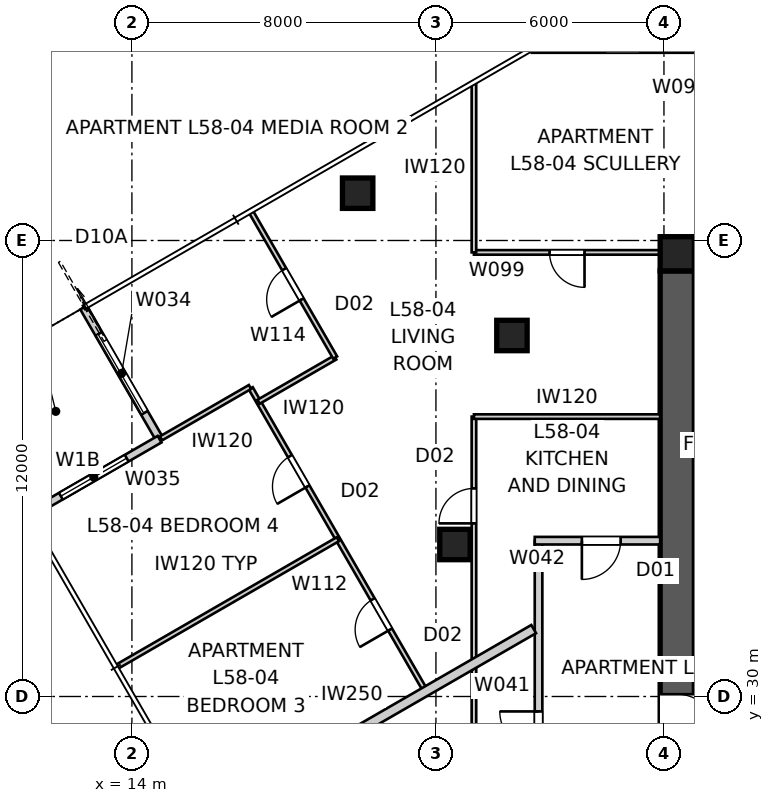
"""IFC4 building model, lengths in metres.
Left out: names, types, materials, properties, quantities, classifications, styles, units other than length and angle.
Written with IfcOpenShell. Run it as: python <this file> out.ifc"""

import sys

from ifc_helpers import new_model, si_unit, direction, frame, frame_2d, origin, origin_2d, place, context, subcontext, project, spatial, polyline, rectangle, outline, extrude, element, fill, save


model = new_model("IFC4")
c1 = context("Model", 3, precision=1e-05, world=origin(), true_north=direction((0.0, 1.0)))
c2 = subcontext(c1, "Body", "Model", "MODEL_VIEW")
j1 = project(units=[si_unit("LENGTHUNIT", "METRE"), si_unit("PLANEANGLEUNIT", "RADIAN")], contexts=[c1])
p1 = place(None, origin())
s1 = spatial("IfcSite", under=j1, at=p1, CompositionType="ELEMENT")
p2 = place(p1, origin())
s2 = spatial("IfcBuilding", under=s1, at=p2, CompositionType="ELEMENT")
p3 = place(p2, frame((0.0, 0.0, 211.6)))
s3 = spatial("IfcBuildingStorey", under=s2, at=p3, CompositionType="ELEMENT", Elevation=211.6)
p4 = place(p3, frame((28.8, 41.65, 0.0), z_axis=(0.0, 0.0, 1.0), x_axis=(1.0, 0.0, 0.0)))
e1 = element("IfcWall", 1, at=p4, inside=s3, PredefinedType="SHEAR", context=c2, shape_type="SweptSolid", body=[
    extrude(outline(polyline([(0.0, -0.45), (22.4, -0.45), (22.4, -0.025), (22.85, -0.025), (22.85, 0.025), (22.4, 0.025), (22.4, 0.45), (0.0, 0.45), (0.0, 0.025), (-0.45, 0.025), (-0.45, -0.025), (0.0, -0.025), (0.0, -0.45)])), origin(), (0.0, 0.0, 1.0), 3.4),
])
p5 = place(p3, frame((28.35, 41.2, 0.0), z_axis=(0.0, 0.0, 1.0), x_axis=(0.0, -1.0, 0.0)))
e2 = element("IfcWall", 2, at=p5, inside=s3, PredefinedType="SHEAR", context=c2, shape_type="SweptSolid", body=[
    extrude(outline(polyline([(0.0, -0.45), (22.4, -0.45), (22.4, -0.025), (22.85, -0.025), (22.85, 0.025), (22.4, 0.025), (22.4, 0.45), (0.0, 0.45), (0.0, 0.025), (-0.45, 0.025), (-0.45, -0.025), (0.0, -0.025), (0.0, -0.45)])), origin(), (0.0, 0.0, 1.0), 3.4),
])
p6 = place(p5, frame((11.14, 0.0, 0.0)))
e3 = element("IfcOpeningElement", 3, at=p6, cuts=e2, PredefinedType="OPENING", context=c2, shape_type="SweptSolid", body=[
    extrude(rectangle(XDim=1.02, YDim=2.4, at=frame_2d((0.51, 1.2))), frame((0.0, 0.46, 0.0), z_axis=(0.0, -1.0, 0.0), x_axis=(1.0, 0.0, 0.0)), (0.0, 0.0, 1.0), 0.92),
])
p7 = place(p3, frame((28.35, 41.65, 0.0), z_axis=(0.0, 0.0, 1.0), x_axis=(1.0, 0.0, 0.0)))
e4 = element("IfcColumn", 4, at=p7, inside=s3, PredefinedType="COLUMN", context=c2, shape_type="SweptSolid", body=[
    extrude(rectangle(XDim=0.9, YDim=0.9, at=origin_2d()), origin(), (0.0, 0.0, 1.0), 3.4),
])
for number, where, z_axis, x_axis in (
    (5, (19.94, 43.245, 0.0), (0.0, 0.0, 1.0), (1.0, 0.0, 0.0)),
    (6, (24.0, 39.5, 0.0), (0.0, 0.0, 1.0), (1.0, 0.0, 0.0)),
    (7, (22.5, 34.0, 0.0), (0.0, 0.0, 1.0), (1.0, 0.0, 0.0)),
):
    element("IfcColumn", number, at=place(p3, frame(where, z_axis=z_axis, x_axis=x_axis)), inside=s3, PredefinedType="COLUMN", context=c2, shape_type="SweptSolid", body=[
        extrude(rectangle(XDim=0.8, YDim=0.8, at=origin_2d()), origin(), (0.0, 0.0, 1.0), 3.4),
    ])
p8 = place(p3, frame((12.729, 40.236, 0.0), z_axis=(0.0, 0.0, 1.0), x_axis=(0.49999894854, -0.866026010844, 0.0)))
e8 = element("IfcWall", 8, at=p8, inside=s3, PredefinedType="SOLIDWALL", context=c2, shape_type="SweptSolid", body=[
    extrude(rectangle(XDim=4.0, YDim=0.2, at=frame_2d((2.0, 0.0))), origin(), (0.0, 0.0, 1.0), 3.25),
])
p9 = place(p8, frame((0.8, 0.0, 0.0)))
e9 = element("IfcOpeningElement", 9, at=p9, cuts=e8, PredefinedType="OPENING", context=c2, shape_type="SweptSolid", body=[
    extrude(rectangle(XDim=2.4, YDim=2.1, at=frame_2d((1.2, 1.05))), frame((0.0, 0.11, 0.0), z_axis=(0.0, -1.0, 0.0), x_axis=(1.0, 0.0, 0.0)), (0.0, 0.0, 1.0), 0.22),
])
p10 = place(p3, frame((14.729, 36.771, 0.0), z_axis=(0.0, 0.0, 1.0), x_axis=(-0.866026010844, -0.49999894854, 0.0)))
e10 = element("IfcWall", 10, at=p10, inside=s3, PredefinedType="SOLIDWALL", context=c2, shape_type="SweptSolid", body=[
    extrude(rectangle(XDim=4.0, YDim=0.2, at=frame_2d((2.0, 0.0))), origin(), (0.0, 0.0, 1.0), 3.25),
])
p11 = place(p10, frame((1.0, 0.0, 0.45)))
e11 = element("IfcOpeningElement", 11, at=p11, cuts=e10, PredefinedType="OPENING", context=c2, shape_type="SweptSolid", body=[
    extrude(rectangle(XDim=2.0, YDim=1.8, at=frame_2d((1.0, 0.9))), frame((0.0, 0.11, 0.0), z_axis=(0.0, -1.0, 0.0), x_axis=(1.0, 0.0, 0.0)), (0.0, 0.0, 1.0), 0.22),
])
p12 = place(p3, frame((24.7, 25.9, 0.0), z_axis=(0.0, 0.0, 1.0), x_axis=(0.0, 1.0, 0.0)))
e12 = element("IfcWall", 12, at=p12, inside=s3, PredefinedType="PARTITIONING", context=c2, shape_type="SweptSolid", body=[
    extrude(rectangle(XDim=8.2, YDim=0.2, at=frame_2d((4.1, 0.0))), origin(), (0.0, 0.0, 1.0), 3.25),
])
p13 = place(p12, frame((2.687, 0.0, 0.0)))
e13 = element("IfcOpeningElement", 13, at=p13, cuts=e12, PredefinedType="OPENING", context=c2, shape_type="SweptSolid", body=[
    extrude(rectangle(XDim=1.02, YDim=2.34, at=frame_2d((0.51, 1.17))), frame((0.0, 0.11, 0.0), z_axis=(0.0, -1.0, 0.0), x_axis=(1.0, 0.0, 0.0)), (0.0, 0.0, 1.0), 0.22),
])
p14 = place(p3, frame((27.9, 34.1, 0.0), z_axis=(0.0, 0.0, 1.0), x_axis=(-1.0, 0.0, 0.0)))
e14 = element("IfcWall", 14, at=p14, inside=s3, PredefinedType="PARTITIONING", context=c2, shape_type="SweptSolid", body=[
    extrude(rectangle(XDim=3.3, YDim=0.2, at=frame_2d((1.65, 0.0))), origin(), (0.0, 0.0, 1.0), 3.25),
])
p15 = place(p14, frame((1.04, 0.0, 0.0)))
e15 = element("IfcOpeningElement", 15, at=p15, cuts=e14, PredefinedType="OPENING", context=c2, shape_type="SweptSolid", body=[
    extrude(rectangle(XDim=1.02, YDim=2.34, at=frame_2d((0.51, 1.17))), frame((0.0, 0.11, 0.0), z_axis=(0.0, -1.0, 0.0), x_axis=(1.0, 0.0, 0.0)), (0.0, 0.0, 1.0), 0.22),
])
p16 = place(p3, frame((15.889, 26.761, 0.0), z_axis=(0.0, 0.0, 1.0), x_axis=(0.866024190901, 0.50000210077, 0.0)))
e16 = element("IfcWall", 16, at=p16, inside=s3, PredefinedType="PARTITIONING", context=c2, shape_type="SweptSolid", body=[
    extrude(rectangle(XDim=10.026, YDim=0.25, at=frame_2d((5.013, 0.0))), origin(), (0.0, 0.0, 1.0), 3.25),
])
p17 = place(p3, frame((23.0, 20.185, 0.0), z_axis=(0.0, 0.0, 1.0), x_axis=(0.0, 1.0, 0.0)))
e17 = element("IfcWall", 17, at=p17, inside=s3, PredefinedType="PARTITIONING", context=c2, shape_type="SweptSolid", body=[
    extrude(rectangle(XDim=17.18, YDim=0.12, at=frame_2d((8.59, 0.0))), origin(), (0.0, 0.0, 1.0), 2.55),
])
p18 = place(p17, frame((7.688, 0.0, 0.0)))
e18 = element("IfcOpeningElement", 18, at=p18, cuts=e17, PredefinedType="OPENING", context=c2, shape_type="SweptSolid", body=[
    extrude(rectangle(XDim=0.92, YDim=2.34, at=frame_2d((0.46, 1.17))), frame((0.0, 0.07, 0.0), z_axis=(0.0, -1.0, 0.0), x_axis=(1.0, 0.0, 0.0)), (0.0, 0.0, 1.0), 0.14),
])
p19 = place(p17, frame((14.371, 0.0, 0.0)))
e19 = element("IfcOpeningElement", 19, at=p19, cuts=e17, PredefinedType="OPENING", context=c2, shape_type="SweptSolid", body=[
    extrude(rectangle(XDim=0.92, YDim=2.34, at=frame_2d((0.46, 1.17))), frame((0.0, 0.07, 0.0), z_axis=(0.0, -1.0, 0.0), x_axis=(1.0, 0.0, 0.0)), (0.0, 0.0, 1.0), 0.14),
])
p20 = place(p3, frame((23.0, 37.365, 0.0), z_axis=(0.0, 0.0, 1.0), x_axis=(1.0, 0.0, 0.0)))
e20 = element("IfcWall", 20, at=p20, inside=s3, PredefinedType="PARTITIONING", context=c2, shape_type="SweptSolid", body=[
    extrude(rectangle(XDim=4.9, YDim=0.12, at=frame_2d((2.45, 0.0))), origin(), (0.0, 0.0, 1.0), 3.25),
])
p21 = place(p3, frame((27.9, 41.687, 0.0), z_axis=(0.0, 0.0, 1.0), x_axis=(-1.0, 0.0, 0.0)))
e21 = element("IfcWall", 21, at=p21, inside=s3, PredefinedType="PARTITIONING", context=c2, shape_type="SweptSolid", body=[
    extrude(rectangle(XDim=4.9, YDim=0.12, at=frame_2d((2.45, 0.0))), origin(), (0.0, 0.0, 1.0), 3.25),
])
p22 = place(p21, frame((1.99, 0.0, 0.0)))
e22 = element("IfcOpeningElement", 22, at=p22, cuts=e21, PredefinedType="OPENING", context=c2, shape_type="SweptSolid", body=[
    extrude(rectangle(XDim=0.92, YDim=2.1, at=frame_2d((0.46, 1.05))), frame((0.0, 0.07, 0.0), z_axis=(0.0, -1.0, 0.0), x_axis=(1.0, 0.0, 0.0)), (0.0, 0.0, 1.0), 0.14),
])
p23 = place(p3, frame((23.0, 41.687, 0.0), z_axis=(0.0, 0.0, 1.0), x_axis=(0.0, 1.0, 0.0)))
e23 = element("IfcWall", 23, at=p23, inside=s3, PredefinedType="PARTITIONING", context=c2, shape_type="SweptSolid", body=[
    extrude(rectangle(XDim=4.433, YDim=0.12, at=frame_2d((2.216, 0.0))), origin(), (0.0, 0.0, 1.0), 3.25),
])
p24 = place(p3, frame((24.525, 47.0, 0.0), z_axis=(0.0, 0.0, 1.0), x_axis=(1.0, 0.0, 0.0)))
e24 = element("IfcWall", 24, at=p24, inside=s3, PredefinedType="PARTITIONING", context=c2, shape_type="SweptSolid", body=[
    extrude(rectangle(XDim=22.087, YDim=0.12, at=frame_2d((11.044, 0.0))), origin(), (0.0, 0.0, 1.0), 2.55),
])
p25 = place(p24, frame((1.928, 0.0, 0.0)))
e25 = element("IfcOpeningElement", 25, at=p25, cuts=e24, PredefinedType="OPENING", context=c2, shape_type="SweptSolid", body=[
    extrude(rectangle(XDim=0.92, YDim=2.34, at=frame_2d((0.46, 1.17))), frame((0.0, 0.07, 0.0), z_axis=(0.0, -1.0, 0.0), x_axis=(1.0, 0.0, 0.0)), (0.0, 0.0, 1.0), 0.14),
])
p26 = place(p24, frame((17.73, 0.0, 0.0)))
e26 = element("IfcOpeningElement", 26, at=p26, cuts=e24, PredefinedType="OPENING", context=c2, shape_type="SweptSolid", body=[
    extrude(rectangle(XDim=0.96, YDim=2.1, at=frame_2d((0.48, 1.05))), frame((0.0, 0.07, 0.0), z_axis=(0.0, -1.0, 0.0), x_axis=(1.0, 0.0, 0.0)), (0.0, 0.0, 1.0), 0.14),
])
p27 = place(p3, frame((21.733, 30.134, 0.0), z_axis=(0.0, 0.0, 1.0), x_axis=(-0.500019218905, 0.86601430746, 0.0)))
e27 = element("IfcWall", 27, at=p27, inside=s3, PredefinedType="PARTITIONING", context=c2, shape_type="SweptSolid", body=[
    extrude(rectangle(XDim=9.21, YDim=0.12, at=frame_2d((4.605, 0.0))), origin(), (0.0, 0.0, 1.0), 3.25),
])
p28 = place(p27, frame((1.877, 0.0, 0.0)))
e28 = element("IfcOpeningElement", 28, at=p28, cuts=e27, PredefinedType="OPENING", context=c2, shape_type="SweptSolid", body=[
    extrude(rectangle(XDim=0.92, YDim=2.34, at=frame_2d((0.46, 1.17))), frame((0.0, 0.07, 0.0), z_axis=(0.0, -1.0, 0.0), x_axis=(1.0, 0.0, 0.0)), (0.0, 0.0, 1.0), 0.14),
])
p29 = place(p27, frame((6.228, 0.0, 0.0)))
e29 = element("IfcOpeningElement", 29, at=p29, cuts=e27, PredefinedType="OPENING", context=c2, shape_type="SweptSolid", body=[
    extrude(rectangle(XDim=0.92, YDim=2.34, at=frame_2d((0.46, 1.17))), frame((0.0, 0.07, 0.0), z_axis=(0.0, -1.0, 0.0), x_axis=(1.0, 0.0, 0.0)), (0.0, 0.0, 1.0), 0.14),
])
p30 = place(p3, frame((17.333, 37.755, 0.0), z_axis=(0.0, 0.0, 1.0), x_axis=(0.866059848015, 0.499940336097, 0.0)))
e30 = element("IfcWall", 30, at=p30, inside=s3, PredefinedType="PARTITIONING", context=c2, shape_type="SweptSolid", body=[
    extrude(rectangle(XDim=2.328, YDim=0.12, at=frame_2d((1.164, 0.0))), origin(), (0.0, 0.0, 1.0), 3.25),
])
p31 = place(p3, frame((19.349, 38.919, 0.0), z_axis=(0.0, 0.0, 1.0), x_axis=(-0.499997192861, 0.866027024481, 0.0)))
e31 = element("IfcWall", 31, at=p31, inside=s3, PredefinedType="PARTITIONING", context=c2, shape_type="SweptSolid", body=[
    extrude(rectangle(XDim=4.41, YDim=0.12, at=frame_2d((2.205, 0.0))), origin(), (0.0, 0.0, 1.0), 3.25),
])
p32 = place(p31, frame((1.765, 0.0, 0.0)))
e32 = element("IfcOpeningElement", 32, at=p32, cuts=e31, PredefinedType="OPENING", context=c2, shape_type="SweptSolid", body=[
    extrude(rectangle(XDim=0.92, YDim=2.34, at=frame_2d((0.46, 1.17))), frame((0.0, 0.07, 0.0), z_axis=(0.0, -1.0, 0.0), x_axis=(1.0, 0.0, 0.0)), (0.0, 0.0, 1.0), 0.14),
])
p33 = place(p3, frame((13.612, 30.786, 0.0), z_axis=(0.0, 0.0, 1.0), x_axis=(0.866030409726, 0.499991329354, 0.0)))
e33 = element("IfcWall", 33, at=p33, inside=s3, PredefinedType="PARTITIONING", context=c2, shape_type="SweptSolid", body=[
    extrude(rectangle(XDim=6.707, YDim=0.12, at=frame_2d((3.354, 0.0))), origin(), (0.0, 0.0, 1.0), 3.25),
])
p34 = place(p3, frame((14.763, 36.792, 0.0), z_axis=(0.0, 0.0, 1.0), x_axis=(0.86601436245, 0.500019123664, 0.0)))
e34 = element("IfcWall", 34, at=p34, inside=s3, PredefinedType="PARTITIONING", context=c2, shape_type="SweptSolid", body=[
    extrude(rectangle(XDim=2.707, YDim=0.12, at=frame_2d((1.354, 0.0))), origin(), (0.0, 0.0, 1.0), 3.25),
])
p35 = place(p3, frame((27.9, 41.687, 0.0), z_axis=(0.0, 0.0, 1.0), x_axis=(0.999162409553, -0.040920402453, 0.0)))
e35 = element("IfcWall", 35, at=p35, inside=s3, PredefinedType="PARTITIONING", context=c2, shape_type="SweptSolid", body=[
    extrude(rectangle(XDim=0.901, YDim=0.12, at=frame_2d((0.45, 0.0))), origin(), (0.0, 0.0, 1.0), 3.25),
])
p36 = place(p9, origin())
e36 = element("IfcDoor", 36, at=p36, inside=s3, OperationType="SLIDING_TO_LEFT", PredefinedType="DOOR", context=c2, shape_type="SweptSolid", body=[
    extrude(rectangle(XDim=2.4, YDim=2.1, at=frame_2d((1.2, 1.05))), frame((0.0, 0.025, 0.0), z_axis=(0.0, -1.0, 0.0), x_axis=(1.0, 0.0, 0.0)), (0.0, 0.0, 1.0), 0.05),
])
fill(e9, e36)
p37 = place(p11, origin())
e37 = element("IfcWindow", 37, at=p37, inside=s3, PartitioningType="SINGLE_PANEL", PredefinedType="WINDOW", context=c2, shape_type="SweptSolid", body=[
    extrude(rectangle(XDim=2.0, YDim=1.8, at=frame_2d((1.0, 0.9))), frame((0.0, 0.03, 0.0), z_axis=(0.0, -1.0, 0.0), x_axis=(1.0, 0.0, 0.0)), (0.0, 0.0, 1.0), 0.06),
])
fill(e11, e37)
p38 = place(p13, origin())
e38 = element("IfcDoor", 38, at=p38, inside=s3, OperationType="SINGLE_SWING_RIGHT", PredefinedType="DOOR", context=c2, shape_type="SweptSolid", body=[
    extrude(rectangle(XDim=1.02, YDim=2.34, at=frame_2d((0.51, 1.17))), frame((0.0, 0.025, 0.0), z_axis=(0.0, -1.0, 0.0), x_axis=(1.0, 0.0, 0.0)), (0.0, 0.0, 1.0), 0.05),
])
fill(e13, e38)
p39 = place(p15, origin())
e39 = element("IfcDoor", 39, at=p39, inside=s3, OperationType="SINGLE_SWING_RIGHT", PredefinedType="DOOR", context=c2, shape_type="SweptSolid", body=[
    extrude(rectangle(XDim=1.02, YDim=2.34, at=frame_2d((0.51, 1.17))), frame((0.0, 0.025, 0.0), z_axis=(0.0, -1.0, 0.0), x_axis=(1.0, 0.0, 0.0)), (0.0, 0.0, 1.0), 0.05),
])
fill(e15, e39)
p40 = place(p19, origin())
e40 = element("IfcDoor", 40, at=p40, inside=s3, OperationType="SINGLE_SWING_LEFT", PredefinedType="DOOR", context=c2, shape_type="SweptSolid", body=[
    extrude(rectangle(XDim=0.92, YDim=2.34, at=frame_2d((0.46, 1.17))), frame((0.0, 0.025, 0.0), z_axis=(0.0, -1.0, 0.0), x_axis=(1.0, 0.0, 0.0)), (0.0, 0.0, 1.0), 0.05),
])
fill(e19, e40)
p41 = place(p22, origin())
e41 = element("IfcDoor", 41, at=p41, inside=s3, OperationType="SINGLE_SWING_LEFT", PredefinedType="DOOR", context=c2, shape_type="SweptSolid", body=[
    extrude(rectangle(XDim=0.92, YDim=2.1, at=frame_2d((0.46, 1.05))), frame((0.0, 0.025, 0.0), z_axis=(0.0, -1.0, 0.0), x_axis=(1.0, 0.0, 0.0)), (0.0, 0.0, 1.0), 0.05),
])
fill(e22, e41)
p42 = place(p28, origin())
e42 = element("IfcDoor", 42, at=p42, inside=s3, OperationType="SINGLE_SWING_LEFT", PredefinedType="DOOR", context=c2, shape_type="SweptSolid", body=[
    extrude(rectangle(XDim=0.92, YDim=2.34, at=frame_2d((0.46, 1.17))), frame((0.0, 0.025, 0.0), z_axis=(0.0, -1.0, 0.0), x_axis=(1.0, 0.0, 0.0)), (0.0, 0.0, 1.0), 0.05),
])
fill(e28, e42)
p43 = place(p32, origin())
e43 = element("IfcDoor", 43, at=p43, inside=s3, OperationType="SINGLE_SWING_LEFT", PredefinedType="DOOR", context=c2, shape_type="SweptSolid", body=[
    extrude(rectangle(XDim=0.92, YDim=2.34, at=frame_2d((0.46, 1.17))), frame((0.0, 0.025, 0.0), z_axis=(0.0, -1.0, 0.0), x_axis=(1.0, 0.0, 0.0)), (0.0, 0.0, 1.0), 0.05),
])
fill(e32, e43)
p44 = place(p29, origin())
e44 = element("IfcDoor", 44, at=p44, inside=s3, OperationType="SINGLE_SWING_LEFT", PredefinedType="DOOR", context=c2, shape_type="SweptSolid", body=[
    extrude(rectangle(XDim=0.92, YDim=2.34, at=frame_2d((0.46, 1.17))), frame((0.0, 0.025, 0.0), z_axis=(0.0, -1.0, 0.0), x_axis=(1.0, 0.0, 0.0)), (0.0, 0.0, 1.0), 0.05),
])
fill(e29, e44)
p45 = place(p6, origin())
e45 = element("IfcDoor", 45, at=p45, inside=s3, OperationType="SINGLE_SWING_RIGHT", PredefinedType="DOOR", context=c2, shape_type="SweptSolid", body=[
    extrude(rectangle(XDim=1.02, YDim=2.4, at=frame_2d((0.51, 1.2))), frame((0.0, 0.025, 0.0), z_axis=(0.0, -1.0, 0.0), x_axis=(1.0, 0.0, 0.0)), (0.0, 0.0, 1.0), 0.05),
])
fill(e3, e45)
save(model, sys.argv[1])
